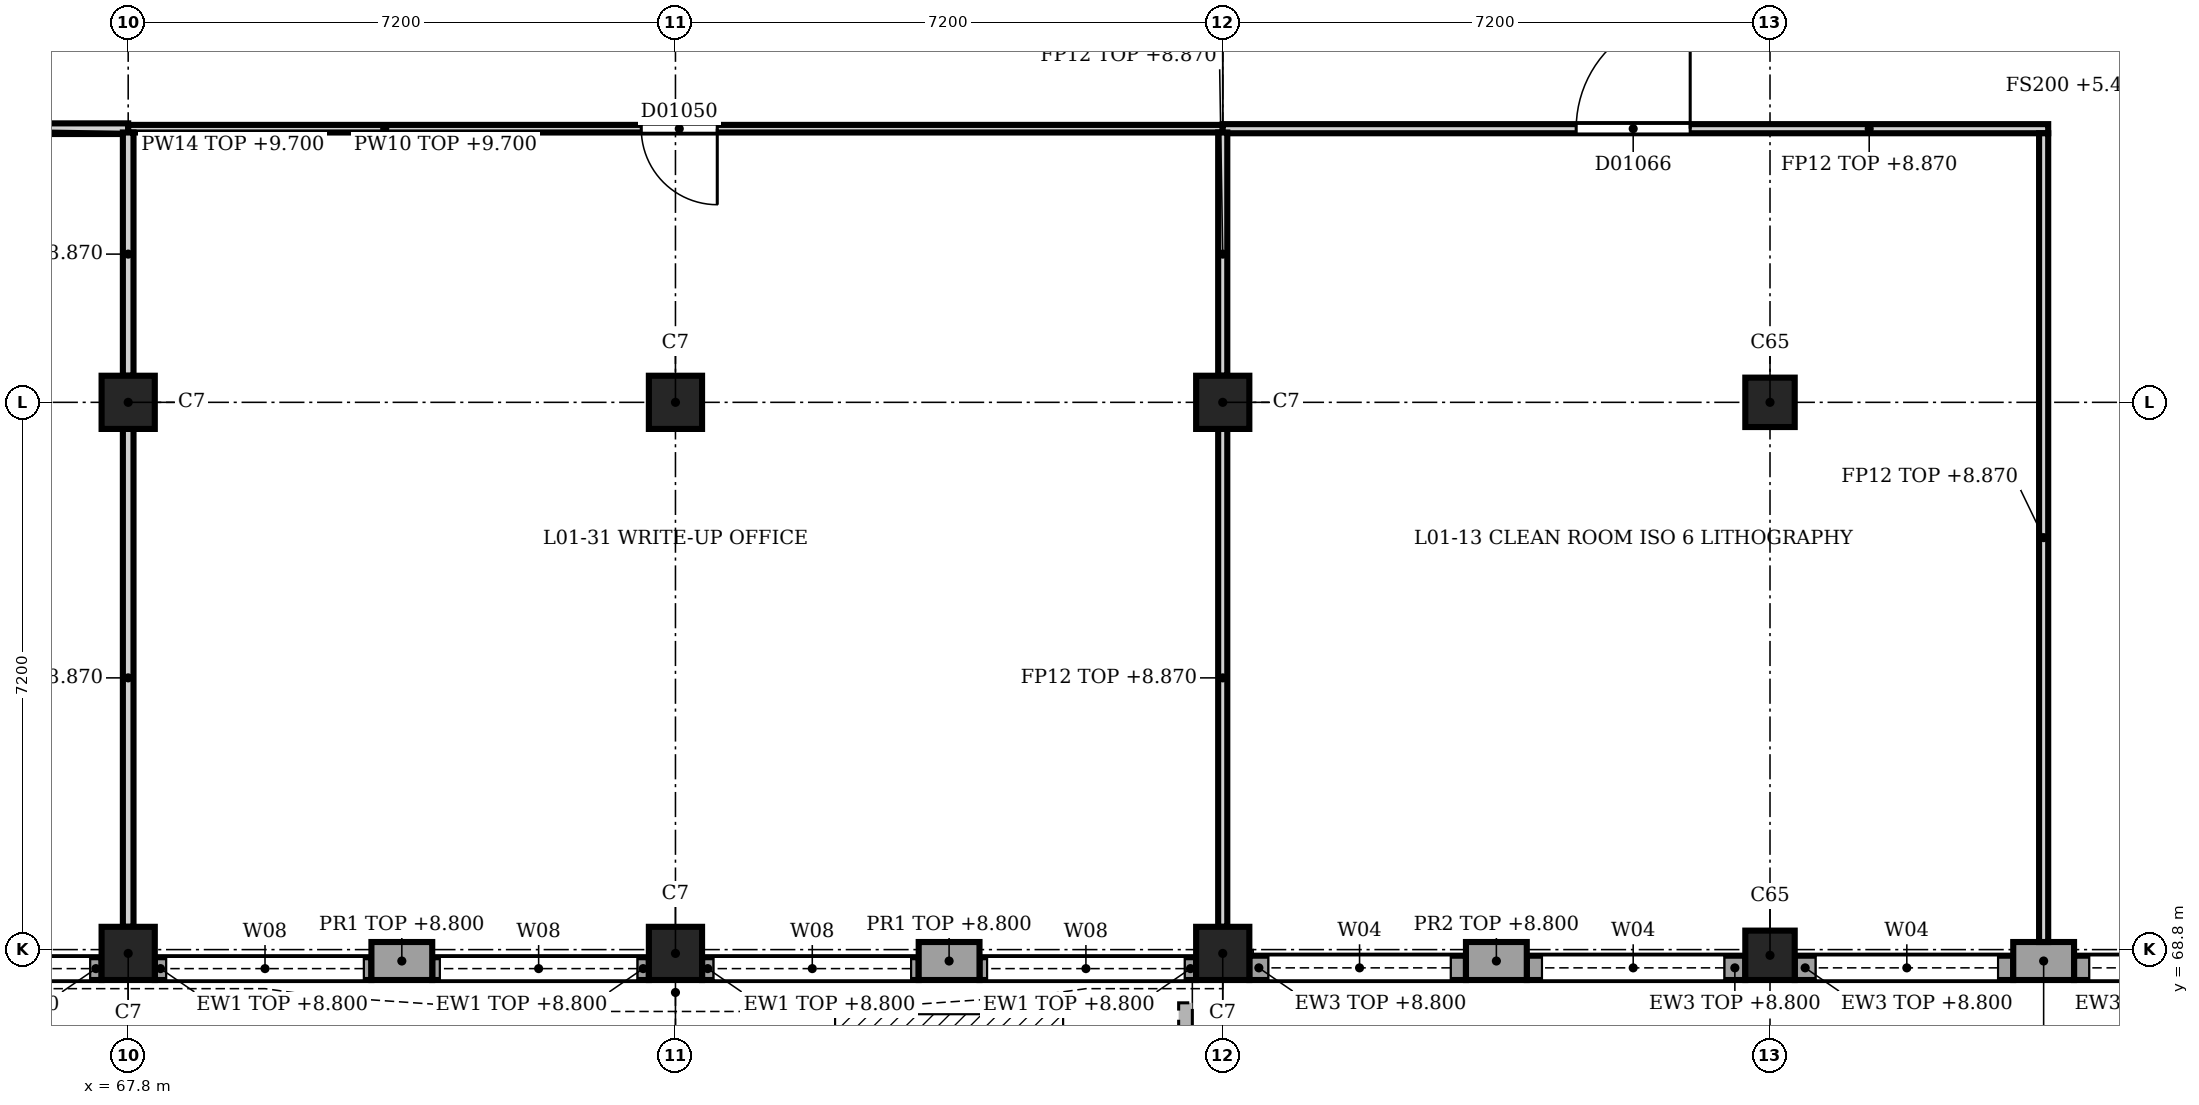
"""IFC4 building model, lengths in metres.
Left out: names, types, materials, properties, quantities, classifications, styles, units other than length and angle.
Written with IfcOpenShell. Run it as: python <this file> out.ifc"""

import sys

from ifc_helpers import new_model, si_unit, direction, frame, frame_2d, origin, origin_2d, place, context, subcontext, project, spatial, rectangle, extrude, element, fill, save


model = new_model("IFC4")
c1 = context("Model", 3, precision=1e-05, world=origin(), true_north=direction((0.0, 1.0)))
c2 = subcontext(c1, "Body", "Model", "MODEL_VIEW")
j1 = project(units=[si_unit("LENGTHUNIT", "METRE"), si_unit("PLANEANGLEUNIT", "RADIAN")], contexts=[c1])
p1 = place(None, origin())
s1 = spatial("IfcSite", under=j1, at=p1, CompositionType="ELEMENT")
p2 = place(p1, origin())
s2 = spatial("IfcBuilding", under=s1, at=p2, CompositionType="ELEMENT")
p3 = place(p2, frame((0.0, 0.0, 5.4)))
s3 = spatial("IfcBuildingStorey", under=s2, at=p3, CompositionType="ELEMENT", Elevation=5.4)
for number, where, z_axis, x_axis in (
    (1, (67.8, 68.75, 0.0), (0.0, 0.0, 1.0), (1.0, 0.0, 0.0)),
    (2, (67.8, 76.0, 0.0), (0.0, 0.0, 1.0), (1.0, 0.0, 0.0)),
    (3, (75.0, 68.75, 0.0), (0.0, 0.0, 1.0), (1.0, 0.0, 0.0)),
    (4, (75.0, 76.0, 0.0), (0.0, 0.0, 1.0), (1.0, 0.0, 0.0)),
    (5, (82.2, 68.75, 0.0), (0.0, 0.0, 1.0), (1.0, 0.0, 0.0)),
    (6, (82.2, 76.0, 0.0), (0.0, 0.0, 1.0), (1.0, 0.0, 0.0)),
):
    element("IfcColumn", number, at=place(p3, frame(where, z_axis=z_axis, x_axis=x_axis)), inside=s3, PredefinedType="COLUMN", context=c2, shape_type="SweptSolid", body=[
        extrude(rectangle(XDim=0.7, YDim=0.7, at=origin_2d()), origin(), (0.0, 0.0, 1.0), 4.5),
    ])
for number, where, z_axis, x_axis in (
    (7, (89.4, 68.725, 0.0), (0.0, 0.0, 1.0), (1.0, 0.0, 0.0)),
    (8, (89.4, 76.0, 0.0), (0.0, 0.0, 1.0), (1.0, 0.0, 0.0)),
):
    element("IfcColumn", number, at=place(p3, frame(where, z_axis=z_axis, x_axis=x_axis)), inside=s3, PredefinedType="COLUMN", context=c2, shape_type="SweptSolid", body=[
        extrude(rectangle(XDim=0.65, YDim=0.65, at=origin_2d()), origin(), (0.0, 0.0, 1.0), 4.5),
    ])
p4 = place(p3, frame((93.4, 68.65, 0.0), z_axis=(0.0, 0.0, 1.0), x_axis=(-1.0, 0.0, 0.0)))
e9 = element("IfcWall", 9, at=p4, inside=s3, PredefinedType="SOLIDWALL", context=c2, shape_type="SweptSolid", body=[
    extrude(rectangle(XDim=0.8, YDim=0.5, at=frame_2d((0.4, 0.0))), origin(), (0.0, 0.0, 1.0), 3.4),
])
p5 = place(p3, frame((86.2, 68.65, 0.0), z_axis=(0.0, 0.0, 1.0), x_axis=(-1.0, 0.0, 0.0)))
e10 = element("IfcWall", 10, at=p5, inside=s3, PredefinedType="SOLIDWALL", context=c2, shape_type="SweptSolid", body=[
    extrude(rectangle(XDim=0.8, YDim=0.5, at=frame_2d((0.4, 0.0))), origin(), (0.0, 0.0, 1.0), 3.4),
])
p6 = place(p3, frame((96.275, 68.56, 0.0), z_axis=(0.0, 0.0, 1.0), x_axis=(-1.0, 0.0, 0.0)))
e11 = element("IfcWall", 11, at=p6, inside=s3, PredefinedType="SOLIDWALL", context=c2, shape_type="SweptSolid", body=[
    extrude(rectangle(XDim=2.875, YDim=0.32, at=frame_2d((1.438, 0.0))), origin(), (0.0, 0.0, 1.0), 3.4),
])
p7 = place(p6, frame((0.275, 0.0, 1.9)))
e12 = element("IfcOpeningElement", 12, at=p7, cuts=e11, PredefinedType="OPENING", context=c2, shape_type="SweptSolid", body=[
    extrude(rectangle(XDim=2.4, YDim=1.2, at=frame_2d((1.2, 0.6))), frame((0.0, 0.17, 0.0), z_axis=(0.0, -1.0, 0.0), x_axis=(1.0, 0.0, 0.0)), (0.0, 0.0, 1.0), 0.34),
])
p8 = place(p3, frame((92.6, 68.56, 0.0), z_axis=(0.0, 0.0, 1.0), x_axis=(-1.0, 0.0, 0.0)))
e13 = element("IfcWall", 13, at=p8, inside=s3, PredefinedType="SOLIDWALL", context=c2, shape_type="SweptSolid", body=[
    extrude(rectangle(XDim=2.875, YDim=0.32, at=frame_2d((1.438, 0.0))), origin(), (0.0, 0.0, 1.0), 3.4),
])
p9 = place(p8, frame((0.2, 0.0, 1.9)))
e14 = element("IfcOpeningElement", 14, at=p9, cuts=e13, PredefinedType="OPENING", context=c2, shape_type="SweptSolid", body=[
    extrude(rectangle(XDim=2.4, YDim=1.2, at=frame_2d((1.2, 0.6))), frame((0.0, 0.17, 0.0), z_axis=(0.0, -1.0, 0.0), x_axis=(1.0, 0.0, 0.0)), (0.0, 0.0, 1.0), 0.34),
])
p10 = place(p3, frame((89.075, 68.56, 0.0), z_axis=(0.0, 0.0, 1.0), x_axis=(-1.0, 0.0, 0.0)))
e15 = element("IfcWall", 15, at=p10, inside=s3, PredefinedType="SOLIDWALL", context=c2, shape_type="SweptSolid", body=[
    extrude(rectangle(XDim=2.875, YDim=0.32, at=frame_2d((1.438, 0.0))), origin(), (0.0, 0.0, 1.0), 3.4),
])
p11 = place(p10, frame((0.275, 0.0, 1.9)))
e16 = element("IfcOpeningElement", 16, at=p11, cuts=e15, PredefinedType="OPENING", context=c2, shape_type="SweptSolid", body=[
    extrude(rectangle(XDim=2.4, YDim=1.2, at=frame_2d((1.2, 0.6))), frame((0.0, 0.17, 0.0), z_axis=(0.0, -1.0, 0.0), x_axis=(1.0, 0.0, 0.0)), (0.0, 0.0, 1.0), 0.34),
])
p12 = place(p3, frame((85.4, 68.56, 0.0), z_axis=(0.0, 0.0, 1.0), x_axis=(-1.0, 0.0, 0.0)))
e17 = element("IfcWall", 17, at=p12, inside=s3, PredefinedType="SOLIDWALL", context=c2, shape_type="SweptSolid", body=[
    extrude(rectangle(XDim=2.85, YDim=0.32, at=frame_2d((1.425, 0.0))), origin(), (0.0, 0.0, 1.0), 3.4),
])
p13 = place(p12, frame((0.2, 0.0, 1.9)))
e18 = element("IfcOpeningElement", 18, at=p13, cuts=e17, PredefinedType="OPENING", context=c2, shape_type="SweptSolid", body=[
    extrude(rectangle(XDim=2.4, YDim=1.2, at=frame_2d((1.2, 0.6))), frame((0.0, 0.17, 0.0), z_axis=(0.0, -1.0, 0.0), x_axis=(1.0, 0.0, 0.0)), (0.0, 0.0, 1.0), 0.34),
])
for number, where, z_axis, x_axis in (
    (19, (79.0, 68.65, 0.0), (0.0, 0.0, 1.0), (-1.0, 0.0, 0.0)),
    (20, (71.8, 68.65, 0.0), (0.0, 0.0, 1.0), (-1.0, 0.0, 0.0)),
):
    element("IfcWall", number, at=place(p3, frame(where, z_axis=z_axis, x_axis=x_axis)), inside=s3, PredefinedType="SOLIDWALL", context=c2, shape_type="SweptSolid", body=[
        extrude(rectangle(XDim=0.8, YDim=0.5, at=frame_2d((0.4, 0.0))), origin(), (0.0, 0.0, 1.0), 3.4),
    ])
p14 = place(p3, frame((81.85, 68.55, 0.0), z_axis=(0.0, 0.0, 1.0), x_axis=(-1.0, 0.0, 0.0)))
e21 = element("IfcWall", 21, at=p14, inside=s3, PredefinedType="SOLIDWALL", context=c2, shape_type="SweptSolid", body=[
    extrude(rectangle(XDim=2.85, YDim=0.3, at=frame_2d((1.425, 0.0))), origin(), (0.0, 0.0, 1.0), 3.4),
])
p15 = place(p14, frame((0.15, 0.0, 1.2)))
e22 = element("IfcOpeningElement", 22, at=p15, cuts=e21, PredefinedType="OPENING", context=c2, shape_type="SweptSolid", body=[
    extrude(rectangle(XDim=2.6, YDim=2.1, at=frame_2d((1.3, 1.05))), frame((0.0, 0.16, 0.0), z_axis=(0.0, -1.0, 0.0), x_axis=(1.0, 0.0, 0.0)), (0.0, 0.0, 1.0), 0.32),
])
p16 = place(p3, frame((78.2, 68.55, 0.0), z_axis=(0.0, 0.0, 1.0), x_axis=(-1.0, 0.0, 0.0)))
e23 = element("IfcWall", 23, at=p16, inside=s3, PredefinedType="SOLIDWALL", context=c2, shape_type="SweptSolid", body=[
    extrude(rectangle(XDim=2.85, YDim=0.3, at=frame_2d((1.425, 0.0))), origin(), (0.0, 0.0, 1.0), 3.4),
])
p17 = place(p16, frame((0.1, 0.0, 1.2)))
e24 = element("IfcOpeningElement", 24, at=p17, cuts=e23, PredefinedType="OPENING", context=c2, shape_type="SweptSolid", body=[
    extrude(rectangle(XDim=2.6, YDim=2.1, at=frame_2d((1.3, 1.05))), frame((0.0, 0.16, 0.0), z_axis=(0.0, -1.0, 0.0), x_axis=(1.0, 0.0, 0.0)), (0.0, 0.0, 1.0), 0.32),
])
p18 = place(p3, frame((74.65, 68.55, 0.0), z_axis=(0.0, 0.0, 1.0), x_axis=(-1.0, 0.0, 0.0)))
e25 = element("IfcWall", 25, at=p18, inside=s3, PredefinedType="SOLIDWALL", context=c2, shape_type="SweptSolid", body=[
    extrude(rectangle(XDim=2.85, YDim=0.3, at=frame_2d((1.425, 0.0))), origin(), (0.0, 0.0, 1.0), 3.4),
])
p19 = place(p18, frame((0.15, 0.0, 1.2)))
e26 = element("IfcOpeningElement", 26, at=p19, cuts=e25, PredefinedType="OPENING", context=c2, shape_type="SweptSolid", body=[
    extrude(rectangle(XDim=2.6, YDim=2.1, at=frame_2d((1.3, 1.05))), frame((0.0, 0.16, 0.0), z_axis=(0.0, -1.0, 0.0), x_axis=(1.0, 0.0, 0.0)), (0.0, 0.0, 1.0), 0.32),
])
p20 = place(p3, frame((71.0, 68.55, 0.0), z_axis=(0.0, 0.0, 1.0), x_axis=(-1.0, 0.0, 0.0)))
e27 = element("IfcWall", 27, at=p20, inside=s3, PredefinedType="SOLIDWALL", context=c2, shape_type="SweptSolid", body=[
    extrude(rectangle(XDim=2.85, YDim=0.3, at=frame_2d((1.425, 0.0))), origin(), (0.0, 0.0, 1.0), 3.4),
])
p21 = place(p20, frame((0.1, 0.0, 1.2)))
e28 = element("IfcOpeningElement", 28, at=p21, cuts=e27, PredefinedType="OPENING", context=c2, shape_type="SweptSolid", body=[
    extrude(rectangle(XDim=2.6, YDim=2.1, at=frame_2d((1.3, 1.05))), frame((0.0, 0.16, 0.0), z_axis=(0.0, -1.0, 0.0), x_axis=(1.0, 0.0, 0.0)), (0.0, 0.0, 1.0), 0.32),
])
p22 = place(p3, frame((67.45, 68.55, 0.0), z_axis=(0.0, 0.0, 1.0), x_axis=(-1.0, 0.0, 0.0)))
e29 = element("IfcWall", 29, at=p22, inside=s3, PredefinedType="SOLIDWALL", context=c2, shape_type="SweptSolid", body=[
    extrude(rectangle(XDim=2.85, YDim=0.3, at=frame_2d((1.425, 0.0))), origin(), (0.0, 0.0, 1.0), 3.4),
])
p23 = place(p22, frame((0.15, 0.0, 1.2)))
e30 = element("IfcOpeningElement", 30, at=p23, cuts=e29, PredefinedType="OPENING", context=c2, shape_type="SweptSolid", body=[
    extrude(rectangle(XDim=2.6, YDim=2.1, at=frame_2d((1.3, 1.05))), frame((0.0, 0.16, 0.0), z_axis=(0.0, -1.0, 0.0), x_axis=(1.0, 0.0, 0.0)), (0.0, 0.0, 1.0), 0.32),
])
p24 = place(p3, frame((81.71, 65.1, 0.0), z_axis=(0.0, 0.0, 1.0), x_axis=(0.0, 1.0, 0.0)))
e31 = element("IfcWall", 31, at=p24, inside=s3, PredefinedType="PARAPET", context=c2, shape_type="SweptSolid", body=[
    extrude(rectangle(XDim=3.0, YDim=0.18, at=frame_2d((1.5, 0.0))), origin(), (0.0, 0.0, 1.0), 0.9),
])
p25 = place(p3, frame((67.8, 79.6, 0.0), z_axis=(0.0, 0.0, 1.0), x_axis=(-1.0, 0.0, 0.0)))
e32 = element("IfcWall", 32, at=p25, inside=s3, PredefinedType="PARTITIONING", context=c2, shape_type="SweptSolid", body=[
    extrude(rectangle(XDim=10.8, YDim=0.14, at=frame_2d((5.4, 0.0))), origin(), (0.0, 0.0, 1.0), 4.3),
])
p26 = place(p25, frame((4.85, 0.0, 0.0)))
e33 = element("IfcOpeningElement", 33, at=p26, cuts=e32, PredefinedType="OPENING", context=c2, shape_type="SweptSolid", body=[
    extrude(rectangle(XDim=1.1, YDim=2.2, at=frame_2d((0.55, 1.1))), frame((0.0, 0.08, 0.0), z_axis=(0.0, -1.0, 0.0), x_axis=(1.0, 0.0, 0.0)), (0.0, 0.0, 1.0), 0.16),
])
p27 = place(p3, frame((82.2, 79.6, 0.0), z_axis=(0.0, 0.0, 1.0), x_axis=(-1.0, 0.0, 0.0)))
e34 = element("IfcWall", 34, at=p27, inside=s3, PredefinedType="PARTITIONING", context=c2, shape_type="SweptSolid", body=[
    extrude(rectangle(XDim=14.4, YDim=0.1, at=frame_2d((7.2, 0.0))), origin(), (0.0, 0.0, 1.0), 4.3),
])
p28 = place(p27, frame((6.65, 0.0, 0.0)))
e35 = element("IfcOpeningElement", 35, at=p28, cuts=e34, PredefinedType="OPENING", context=c2, shape_type="SweptSolid", body=[
    extrude(rectangle(XDim=1.0, YDim=2.1, at=frame_2d((0.5, 1.05))), frame((0.0, 0.06, 0.0), z_axis=(0.0, -1.0, 0.0), x_axis=(1.0, 0.0, 0.0)), (0.0, 0.0, 1.0), 0.12),
])
p29 = place(p3, frame((93.06, 79.6, 0.0), z_axis=(0.0, 0.0, 1.0), x_axis=(-1.0, 0.0, 0.0)))
e36 = element("IfcWall", 36, at=p29, inside=s3, PredefinedType="PARTITIONING", context=c2, shape_type="SweptSolid", body=[
    extrude(rectangle(XDim=10.86, YDim=0.12, at=frame_2d((5.43, 0.0))), origin(), (0.0, 0.0, 1.0), 3.47),
])
p30 = place(p29, frame((4.71, 0.0, 0.0)))
e37 = element("IfcOpeningElement", 37, at=p30, cuts=e36, PredefinedType="OPENING", context=c2, shape_type="SweptSolid", body=[
    extrude(rectangle(XDim=1.5, YDim=2.2, at=frame_2d((0.75, 1.1))), frame((0.0, 0.07, 0.0), z_axis=(0.0, -1.0, 0.0), x_axis=(1.0, 0.0, 0.0)), (0.0, 0.0, 1.0), 0.14),
])
p31 = place(p3, frame((67.8, 69.1, 0.0), z_axis=(0.0, 0.0, 1.0), x_axis=(0.0, 1.0, 0.0)))
e38 = element("IfcWall", 38, at=p31, inside=s3, PredefinedType="PARTITIONING", context=c2, shape_type="SweptSolid", body=[
    extrude(rectangle(XDim=6.55, YDim=0.14, at=frame_2d((3.275, 0.0))), origin(), (0.0, 0.0, 1.0), 3.47),
])
p32 = place(p3, frame((67.8, 76.35, 0.0), z_axis=(0.0, 0.0, 1.0), x_axis=(0.0, 1.0, 0.0)))
e39 = element("IfcWall", 39, at=p32, inside=s3, PredefinedType="PARTITIONING", context=c2, shape_type="SweptSolid", body=[
    extrude(rectangle(XDim=3.2, YDim=0.14, at=frame_2d((1.6, 0.0))), origin(), (0.0, 0.0, 1.0), 3.47),
])
p33 = place(p3, frame((82.2, 69.1, 0.0), z_axis=(0.0, 0.0, 1.0), x_axis=(0.0, 1.0, 0.0)))
e40 = element("IfcWall", 40, at=p33, inside=s3, PredefinedType="PARTITIONING", context=c2, shape_type="SweptSolid", body=[
    extrude(rectangle(XDim=6.55, YDim=0.12, at=frame_2d((3.275, 0.0))), origin(), (0.0, 0.0, 1.0), 3.47),
])
p34 = place(p3, frame((82.2, 76.35, 0.0), z_axis=(0.0, 0.0, 1.0), x_axis=(0.0, 1.0, 0.0)))
e41 = element("IfcWall", 41, at=p34, inside=s3, PredefinedType="PARTITIONING", context=c2, shape_type="SweptSolid", body=[
    extrude(rectangle(XDim=3.2, YDim=0.12, at=frame_2d((1.6, 0.0))), origin(), (0.0, 0.0, 1.0), 3.47),
])
p35 = place(p3, frame((93.0, 68.9, 0.0), z_axis=(0.0, 0.0, 1.0), x_axis=(0.0, 1.0, 0.0)))
e42 = element("IfcWall", 42, at=p35, inside=s3, PredefinedType="PARTITIONING", context=c2, shape_type="SweptSolid", body=[
    extrude(rectangle(XDim=10.64, YDim=0.12, at=frame_2d((5.32, 0.0))), origin(), (0.0, 0.0, 1.0), 3.47),
])
p36 = place(p7, origin())
e43 = element("IfcWindow", 43, at=p36, inside=s3, PartitioningType="SINGLE_PANEL", PredefinedType="WINDOW", context=c2, shape_type="SweptSolid", body=[
    extrude(rectangle(XDim=2.4, YDim=1.2, at=frame_2d((1.2, 0.6))), frame((0.0, 0.03, 0.0), z_axis=(0.0, -1.0, 0.0), x_axis=(1.0, 0.0, 0.0)), (0.0, 0.0, 1.0), 0.06),
])
fill(e12, e43)
p37 = place(p9, origin())
e44 = element("IfcWindow", 44, at=p37, inside=s3, PartitioningType="SINGLE_PANEL", PredefinedType="WINDOW", context=c2, shape_type="SweptSolid", body=[
    extrude(rectangle(XDim=2.4, YDim=1.2, at=frame_2d((1.2, 0.6))), frame((0.0, 0.03, 0.0), z_axis=(0.0, -1.0, 0.0), x_axis=(1.0, 0.0, 0.0)), (0.0, 0.0, 1.0), 0.06),
])
fill(e14, e44)
p38 = place(p11, origin())
e45 = element("IfcWindow", 45, at=p38, inside=s3, PartitioningType="SINGLE_PANEL", PredefinedType="WINDOW", context=c2, shape_type="SweptSolid", body=[
    extrude(rectangle(XDim=2.4, YDim=1.2, at=frame_2d((1.2, 0.6))), frame((0.0, 0.03, 0.0), z_axis=(0.0, -1.0, 0.0), x_axis=(1.0, 0.0, 0.0)), (0.0, 0.0, 1.0), 0.06),
])
fill(e16, e45)
p39 = place(p13, origin())
e46 = element("IfcWindow", 46, at=p39, inside=s3, PartitioningType="SINGLE_PANEL", PredefinedType="WINDOW", context=c2, shape_type="SweptSolid", body=[
    extrude(rectangle(XDim=2.4, YDim=1.2, at=frame_2d((1.2, 0.6))), frame((0.0, 0.03, 0.0), z_axis=(0.0, -1.0, 0.0), x_axis=(1.0, 0.0, 0.0)), (0.0, 0.0, 1.0), 0.06),
])
fill(e18, e46)
p40 = place(p15, origin())
e47 = element("IfcWindow", 47, at=p40, inside=s3, PartitioningType="SINGLE_PANEL", PredefinedType="WINDOW", context=c2, shape_type="SweptSolid", body=[
    extrude(rectangle(XDim=2.6, YDim=2.1, at=frame_2d((1.3, 1.05))), frame((0.0, 0.03, 0.0), z_axis=(0.0, -1.0, 0.0), x_axis=(1.0, 0.0, 0.0)), (0.0, 0.0, 1.0), 0.06),
])
fill(e22, e47)
p41 = place(p17, origin())
e48 = element("IfcWindow", 48, at=p41, inside=s3, PartitioningType="SINGLE_PANEL", PredefinedType="WINDOW", context=c2, shape_type="SweptSolid", body=[
    extrude(rectangle(XDim=2.6, YDim=2.1, at=frame_2d((1.3, 1.05))), frame((0.0, 0.03, 0.0), z_axis=(0.0, -1.0, 0.0), x_axis=(1.0, 0.0, 0.0)), (0.0, 0.0, 1.0), 0.06),
])
fill(e24, e48)
p42 = place(p19, origin())
e49 = element("IfcWindow", 49, at=p42, inside=s3, PartitioningType="SINGLE_PANEL", PredefinedType="WINDOW", context=c2, shape_type="SweptSolid", body=[
    extrude(rectangle(XDim=2.6, YDim=2.1, at=frame_2d((1.3, 1.05))), frame((0.0, 0.03, 0.0), z_axis=(0.0, -1.0, 0.0), x_axis=(1.0, 0.0, 0.0)), (0.0, 0.0, 1.0), 0.06),
])
fill(e26, e49)
p43 = place(p21, origin())
e50 = element("IfcWindow", 50, at=p43, inside=s3, PartitioningType="SINGLE_PANEL", PredefinedType="WINDOW", context=c2, shape_type="SweptSolid", body=[
    extrude(rectangle(XDim=2.6, YDim=2.1, at=frame_2d((1.3, 1.05))), frame((0.0, 0.03, 0.0), z_axis=(0.0, -1.0, 0.0), x_axis=(1.0, 0.0, 0.0)), (0.0, 0.0, 1.0), 0.06),
])
fill(e28, e50)
p44 = place(p23, origin())
e51 = element("IfcWindow", 51, at=p44, inside=s3, PartitioningType="SINGLE_PANEL", PredefinedType="WINDOW", context=c2, shape_type="SweptSolid", body=[
    extrude(rectangle(XDim=2.6, YDim=2.1, at=frame_2d((1.3, 1.05))), frame((0.0, 0.03, 0.0), z_axis=(0.0, -1.0, 0.0), x_axis=(1.0, 0.0, 0.0)), (0.0, 0.0, 1.0), 0.06),
])
fill(e30, e51)
p45 = place(p28, origin())
e52 = element("IfcDoor", 52, at=p45, inside=s3, OperationType="SINGLE_SWING_LEFT", PredefinedType="DOOR", context=c2, shape_type="SweptSolid", body=[
    extrude(rectangle(XDim=1.0, YDim=2.1, at=frame_2d((0.5, 1.05))), frame((0.0, 0.025, 0.0), z_axis=(0.0, -1.0, 0.0), x_axis=(1.0, 0.0, 0.0)), (0.0, 0.0, 1.0), 0.05),
])
fill(e35, e52)
p46 = place(p30, origin())
e53 = element("IfcDoor", 53, at=p46, inside=s3, OperationType="SINGLE_SWING_RIGHT", PredefinedType="DOOR", context=c2, shape_type="SweptSolid", body=[
    extrude(rectangle(XDim=1.5, YDim=2.2, at=frame_2d((0.75, 1.1))), frame((0.0, 0.025, 0.0), z_axis=(0.0, -1.0, 0.0), x_axis=(1.0, 0.0, 0.0)), (0.0, 0.0, 1.0), 0.05),
])
fill(e37, e53)
save(model, sys.argv[1])
